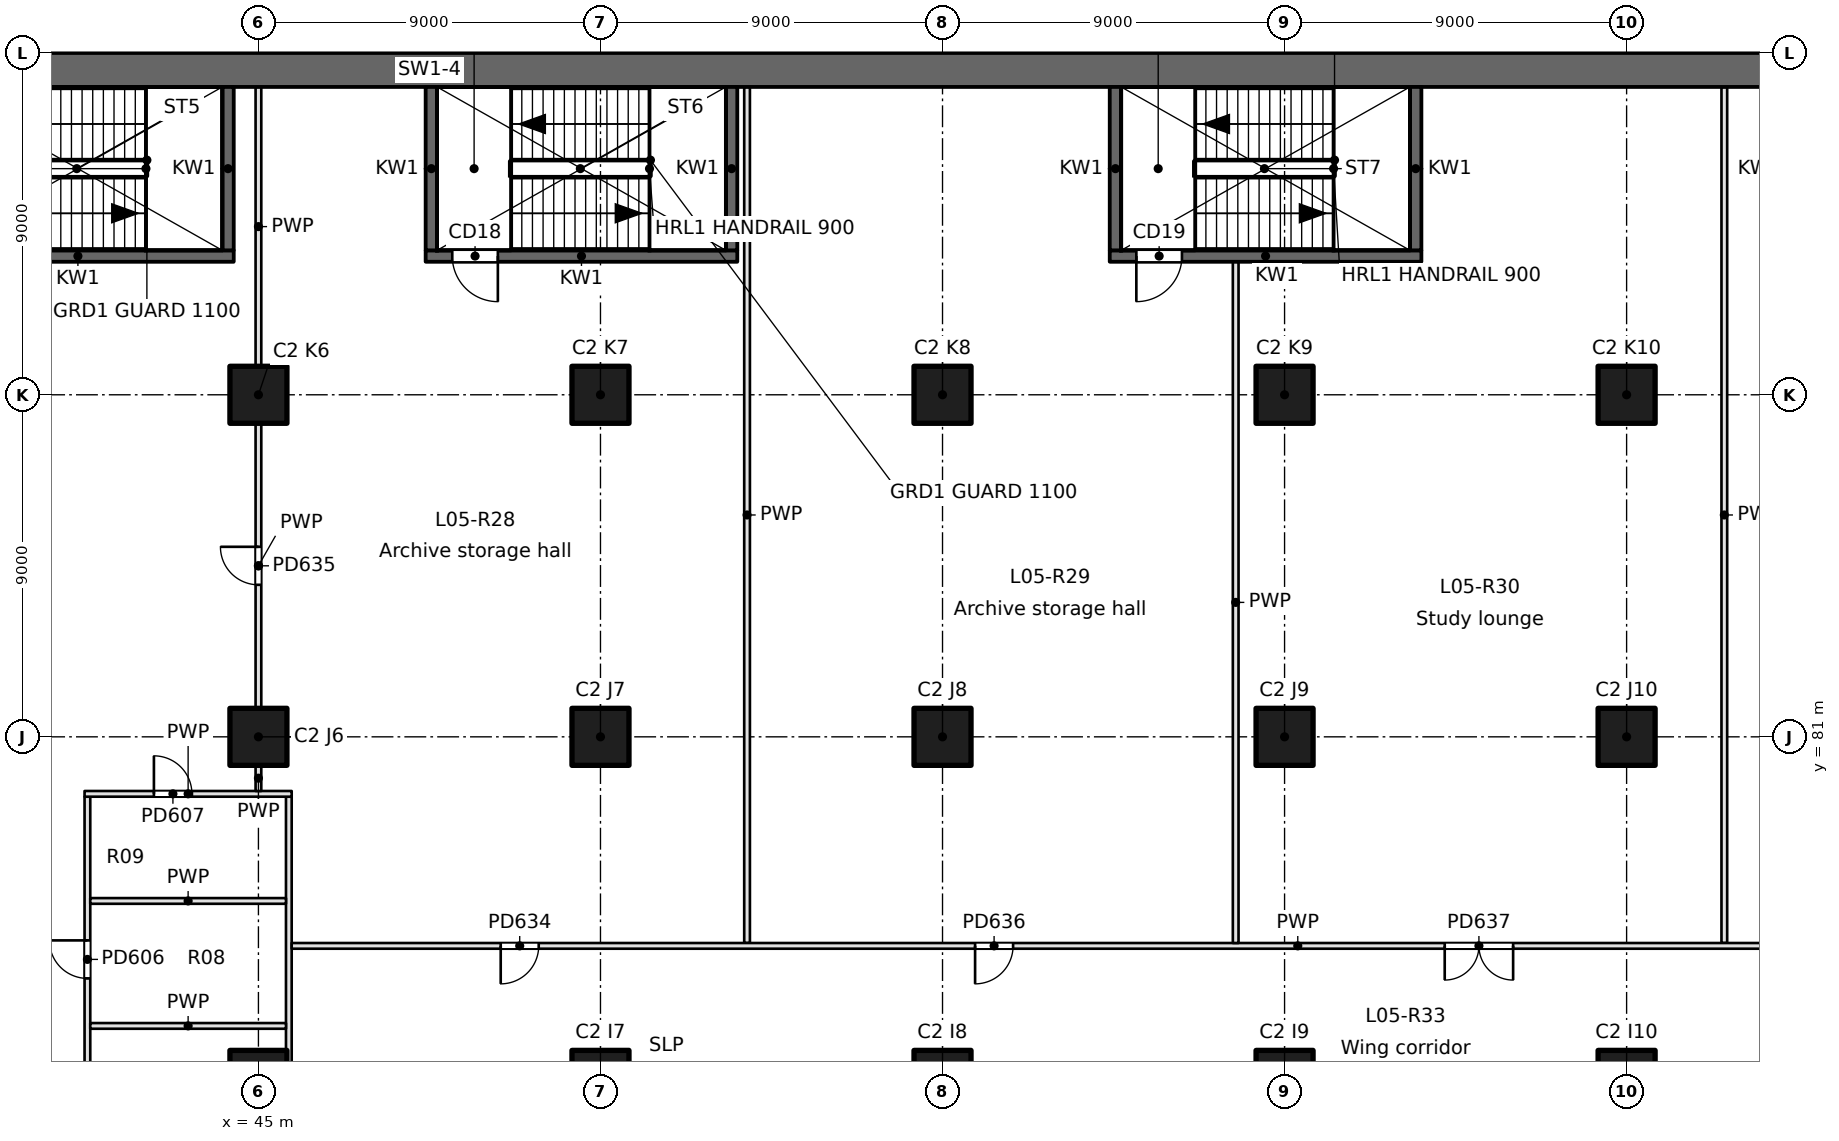
"""IFC4 building model, lengths in metres.
Left out: names, types, materials, properties, quantities, classifications, styles, units other than length and angle.
Written with IfcOpenShell. Run it as: python <this file> out.ifc"""

import sys

from ifc_helpers import new_model, si_unit, direction, frame, frame_2d, origin, origin_2d, place, context, subcontext, project, spatial, rectangle, extrude, element, fill, save


model = new_model("IFC4")
c1 = context("Model", 3, precision=1e-05, world=origin(), true_north=direction((0.0, 1.0)))
c2 = subcontext(c1, "Body", "Model", "MODEL_VIEW")
j1 = project(units=[si_unit("LENGTHUNIT", "METRE"), si_unit("PLANEANGLEUNIT", "RADIAN")], contexts=[c1])
p1 = place(None, origin())
s1 = spatial("IfcSite", under=j1, at=p1, CompositionType="ELEMENT")
p2 = place(p1, origin())
s2 = spatial("IfcBuilding", under=s1, at=p2, CompositionType="ELEMENT")
p3 = place(p2, frame((0.0, 0.0, 26.4)))
s3 = spatial("IfcBuildingStorey", under=s2, at=p3, CompositionType="ELEMENT", Elevation=26.4)
for number, where, z_axis, x_axis in (
    (1, (45.0, 72.0, 0.0), (0.0, 0.0, 1.0), (1.0, 0.0, 0.0)),
    (2, (45.0, 81.0, 0.0), (0.0, 0.0, 1.0), (1.0, 0.0, 0.0)),
    (3, (45.0, 90.0, 0.0), (0.0, 0.0, 1.0), (1.0, 0.0, 0.0)),
    (4, (54.0, 72.0, 0.0), (0.0, 0.0, 1.0), (1.0, 0.0, 0.0)),
    (5, (54.0, 81.0, 0.0), (0.0, 0.0, 1.0), (1.0, 0.0, 0.0)),
    (6, (54.0, 90.0, 0.0), (0.0, 0.0, 1.0), (1.0, 0.0, 0.0)),
    (7, (63.0, 72.0, 0.0), (0.0, 0.0, 1.0), (1.0, 0.0, 0.0)),
    (8, (63.0, 81.0, 0.0), (0.0, 0.0, 1.0), (1.0, 0.0, 0.0)),
    (9, (63.0, 90.0, 0.0), (0.0, 0.0, 1.0), (1.0, 0.0, 0.0)),
    (10, (72.0, 72.0, 0.0), (0.0, 0.0, 1.0), (1.0, 0.0, 0.0)),
    (11, (72.0, 81.0, 0.0), (0.0, 0.0, 1.0), (1.0, 0.0, 0.0)),
    (12, (72.0, 90.0, 0.0), (0.0, 0.0, 1.0), (1.0, 0.0, 0.0)),
    (13, (81.0, 72.0, 0.0), (0.0, 0.0, 1.0), (1.0, 0.0, 0.0)),
    (14, (81.0, 81.0, 0.0), (0.0, 0.0, 1.0), (1.0, 0.0, 0.0)),
    (15, (81.0, 90.0, 0.0), (0.0, 0.0, 1.0), (1.0, 0.0, 0.0)),
):
    element("IfcColumn", number, at=place(p3, frame(where, z_axis=z_axis, x_axis=x_axis)), inside=s3, PredefinedType="COLUMN", context=c2, shape_type="SweptSolid", body=[
        extrude(rectangle(XDim=1.5, YDim=1.5, at=origin_2d()), origin(), (0.0, 0.0, 1.0), 4.8),
    ])
p4 = place(p3, frame((94.5, 98.55, 0.0), z_axis=(0.0, 0.0, 1.0), x_axis=(-1.0, 0.0, 0.0)))
e16 = element("IfcWall", 16, at=p4, inside=s3, PredefinedType="SHEAR", context=c2, shape_type="SweptSolid", body=[
    extrude(rectangle(XDim=90.0, YDim=0.9, at=frame_2d((45.0, 0.0))), origin(), (0.0, 0.0, 1.0), 4.8),
])
p5 = place(p3, frame((36.15, 93.65, -0.35), z_axis=(0.0, 0.0, 1.0), x_axis=(1.0, 0.0, 0.0)))
e17 = element("IfcWall", 17, at=p5, inside=s3, PredefinedType="SOLIDWALL", context=c2, shape_type="SweptSolid", body=[
    extrude(rectangle(XDim=8.2, YDim=0.3, at=frame_2d((4.1, 0.0))), origin(), (0.0, 0.0, 1.0), 4.7),
])
p6 = place(p5, frame((0.7, 0.0, 0.35)))
e18 = element("IfcOpeningElement", 18, at=p6, cuts=e17, PredefinedType="OPENING", context=c2, shape_type="SweptSolid", body=[
    extrude(rectangle(XDim=1.2, YDim=2.1, at=frame_2d((0.6, 1.05))), frame((0.0, 0.15, 0.0), z_axis=(0.0, -1.0, 0.0), x_axis=(1.0, 0.0, 0.0)), (0.0, 0.0, 1.0), 0.3),
])
p7 = place(p3, frame((49.4, 93.65, -0.35), z_axis=(0.0, 0.0, 1.0), x_axis=(1.0, 0.0, 0.0)))
e19 = element("IfcWall", 19, at=p7, inside=s3, PredefinedType="SOLIDWALL", context=c2, shape_type="SweptSolid", body=[
    extrude(rectangle(XDim=8.2, YDim=0.3, at=frame_2d((4.1, 0.0))), origin(), (0.0, 0.0, 1.0), 4.7),
])
p8 = place(p7, frame((0.7, 0.0, 0.35)))
e20 = element("IfcOpeningElement", 20, at=p8, cuts=e19, PredefinedType="OPENING", context=c2, shape_type="SweptSolid", body=[
    extrude(rectangle(XDim=1.2, YDim=2.1, at=frame_2d((0.6, 1.05))), frame((0.0, 0.15, 0.0), z_axis=(0.0, -1.0, 0.0), x_axis=(1.0, 0.0, 0.0)), (0.0, 0.0, 1.0), 0.3),
])
p9 = place(p3, frame((67.4, 93.65, -0.35), z_axis=(0.0, 0.0, 1.0), x_axis=(1.0, 0.0, 0.0)))
e21 = element("IfcWall", 21, at=p9, inside=s3, PredefinedType="SOLIDWALL", context=c2, shape_type="SweptSolid", body=[
    extrude(rectangle(XDim=8.2, YDim=0.3, at=frame_2d((4.1, 0.0))), origin(), (0.0, 0.0, 1.0), 4.7),
])
p10 = place(p9, frame((0.7, 0.0, 0.35)))
e22 = element("IfcOpeningElement", 22, at=p10, cuts=e21, PredefinedType="OPENING", context=c2, shape_type="SweptSolid", body=[
    extrude(rectangle(XDim=1.2, YDim=2.1, at=frame_2d((0.6, 1.05))), frame((0.0, 0.15, 0.0), z_axis=(0.0, -1.0, 0.0), x_axis=(1.0, 0.0, 0.0)), (0.0, 0.0, 1.0), 0.3),
])
for number, where, z_axis, x_axis in (
    (23, (44.2, 93.8, -0.35), (0.0, 0.0, 1.0), (0.0, 1.0, 0.0)),
    (24, (49.55, 93.8, -0.35), (0.0, 0.0, 1.0), (0.0, 1.0, 0.0)),
    (25, (57.45, 93.8, -0.35), (0.0, 0.0, 1.0), (0.0, 1.0, 0.0)),
    (26, (67.55, 93.8, -0.35), (0.0, 0.0, 1.0), (0.0, 1.0, 0.0)),
    (27, (75.45, 93.8, -0.35), (0.0, 0.0, 1.0), (0.0, 1.0, 0.0)),
):
    element("IfcWall", number, at=place(p3, frame(where, z_axis=z_axis, x_axis=x_axis)), inside=s3, PredefinedType="SOLIDWALL", context=c2, shape_type="SweptSolid", body=[
        extrude(rectangle(XDim=4.3, YDim=0.3, at=frame_2d((2.15, 0.0))), origin(), (0.0, 0.0, 1.0), 4.7),
    ])
p11 = place(p3, frame((45.8, 79.425, 0.0), z_axis=(0.0, 0.0, 1.0), x_axis=(0.0, -1.0, 0.0)))
e28 = element("IfcWall", 28, at=p11, inside=s3, PredefinedType="PARTITIONING", context=c2, shape_type="SweptSolid", body=[
    extrude(rectangle(XDim=15.35, YDim=0.15, at=frame_2d((7.675, 0.0))), origin(), (0.0, 0.0, 1.0), 4.35),
])
p12 = place(p3, frame((40.5, 64.075, 0.0), z_axis=(0.0, 0.0, 1.0), x_axis=(0.0, 1.0, 0.0)))
e29 = element("IfcWall", 29, at=p12, inside=s3, PredefinedType="PARTITIONING", context=c2, shape_type="SweptSolid", body=[
    extrude(rectangle(XDim=15.35, YDim=0.15, at=frame_2d((7.675, 0.0))), origin(), (0.0, 0.0, 1.0), 4.35),
])
p13 = place(p12, frame((1.75, 0.0, 0.0)))
e30 = element("IfcOpeningElement", 30, at=p13, cuts=e29, PredefinedType="OPENING", context=c2, shape_type="SweptSolid", body=[
    extrude(rectangle(XDim=1.0, YDim=2.1, at=frame_2d((0.5, 1.05))), frame((0.0, 0.075, 0.0), z_axis=(0.0, -1.0, 0.0), x_axis=(1.0, 0.0, 0.0)), (0.0, 0.0, 1.0), 0.15),
])
p14 = place(p12, frame((6.372, 0.0, 0.0)))
e31 = element("IfcOpeningElement", 31, at=p14, cuts=e29, PredefinedType="OPENING", context=c2, shape_type="SweptSolid", body=[
    extrude(rectangle(XDim=1.0, YDim=2.1, at=frame_2d((0.5, 1.05))), frame((0.0, 0.075, 0.0), z_axis=(0.0, -1.0, 0.0), x_axis=(1.0, 0.0, 0.0)), (0.0, 0.0, 1.0), 0.15),
])
p15 = place(p12, frame((10.569, 0.0, 0.0)))
e32 = element("IfcOpeningElement", 32, at=p15, cuts=e29, PredefinedType="OPENING", context=c2, shape_type="SweptSolid", body=[
    extrude(rectangle(XDim=1.0, YDim=2.1, at=frame_2d((0.5, 1.05))), frame((0.0, 0.075, 0.0), z_axis=(0.0, -1.0, 0.0), x_axis=(1.0, 0.0, 0.0)), (0.0, 0.0, 1.0), 0.15),
])
for number, where, z_axis, x_axis in (
    (33, (40.575, 73.394, 0.0), (0.0, 0.0, 1.0), (1.0, 0.0, 0.0)),
    (34, (40.575, 76.682, 0.0), (0.0, 0.0, 1.0), (1.0, 0.0, 0.0)),
):
    element("IfcWall", number, at=place(p3, frame(where, z_axis=z_axis, x_axis=x_axis)), inside=s3, PredefinedType="PARTITIONING", context=c2, shape_type="SweptSolid", body=[
        extrude(rectangle(XDim=5.15, YDim=0.15, at=frame_2d((2.575, 0.0))), origin(), (0.0, 0.0, 1.0), 4.35),
    ])
p16 = place(p3, frame((40.425, 79.5, 0.0), z_axis=(0.0, 0.0, 1.0), x_axis=(1.0, 0.0, 0.0)))
e35 = element("IfcWall", 35, at=p16, inside=s3, PredefinedType="PARTITIONING", context=c2, shape_type="SweptSolid", body=[
    extrude(rectangle(XDim=5.45, YDim=0.15, at=frame_2d((2.725, 0.0))), origin(), (0.0, 0.0, 1.0), 4.35),
])
p17 = place(p16, frame((1.825, 0.0, 0.0)))
e36 = element("IfcOpeningElement", 36, at=p17, cuts=e35, PredefinedType="OPENING", context=c2, shape_type="SweptSolid", body=[
    extrude(rectangle(XDim=1.0, YDim=2.1, at=frame_2d((0.5, 1.05))), frame((0.0, 0.075, 0.0), z_axis=(0.0, -1.0, 0.0), x_axis=(1.0, 0.0, 0.0)), (0.0, 0.0, 1.0), 0.15),
])
p18 = place(p3, frame((45.0, 79.575, 0.0), z_axis=(0.0, 0.0, 1.0), x_axis=(0.0, 1.0, 0.0)))
e37 = element("IfcWall", 37, at=p18, inside=s3, PredefinedType="PARTITIONING", context=c2, shape_type="SweptSolid", body=[
    extrude(rectangle(XDim=0.675, YDim=0.15, at=frame_2d((0.337, 0.0))), origin(), (0.0, 0.0, 1.0), 4.35),
])
p19 = place(p3, frame((45.0, 81.75, 0.0), z_axis=(0.0, 0.0, 1.0), x_axis=(0.0, 1.0, 0.0)))
e38 = element("IfcWall", 38, at=p19, inside=s3, PredefinedType="PARTITIONING", context=c2, shape_type="SweptSolid", body=[
    extrude(rectangle(XDim=7.5, YDim=0.15, at=frame_2d((3.75, 0.0))), origin(), (0.0, 0.0, 1.0), 4.35),
])
p20 = place(p19, frame((3.25, 0.0, 0.0)))
e39 = element("IfcOpeningElement", 39, at=p20, cuts=e38, PredefinedType="OPENING", context=c2, shape_type="SweptSolid", body=[
    extrude(rectangle(XDim=1.0, YDim=2.1, at=frame_2d((0.5, 1.05))), frame((0.0, 0.075, 0.0), z_axis=(0.0, -1.0, 0.0), x_axis=(1.0, 0.0, 0.0)), (0.0, 0.0, 1.0), 0.15),
])
p21 = place(p3, frame((45.0, 90.75, 0.0), z_axis=(0.0, 0.0, 1.0), x_axis=(0.0, 1.0, 0.0)))
e40 = element("IfcWall", 40, at=p21, inside=s3, PredefinedType="PARTITIONING", context=c2, shape_type="SweptSolid", body=[
    extrude(rectangle(XDim=7.35, YDim=0.15, at=frame_2d((3.675, 0.0))), origin(), (0.0, 0.0, 1.0), 4.35),
])
for number, where, z_axis, x_axis in (
    (41, (83.571, 75.575, 0.0), (0.0, 0.0, 1.0), (0.0, 1.0, 0.0)),
    (42, (57.857, 75.575, 0.0), (0.0, 0.0, 1.0), (0.0, 1.0, 0.0)),
):
    element("IfcWall", number, at=place(p3, frame(where, z_axis=z_axis, x_axis=x_axis)), inside=s3, PredefinedType="PARTITIONING", context=c2, shape_type="SweptSolid", body=[
        extrude(rectangle(XDim=22.525, YDim=0.15, at=frame_2d((11.263, 0.0))), origin(), (0.0, 0.0, 1.0), 4.35),
    ])
p22 = place(p3, frame((98.82, 75.5, 0.0), z_axis=(0.0, 0.0, 1.0), x_axis=(-1.0, 0.0, 0.0)))
e43 = element("IfcWall", 43, at=p22, inside=s3, PredefinedType="PARTITIONING", context=c2, shape_type="SweptSolid", body=[
    extrude(rectangle(XDim=52.945, YDim=0.15, at=frame_2d((26.473, 0.0))), origin(), (0.0, 0.0, 1.0), 4.35),
])
p23 = place(p22, frame((46.445, 0.0, 0.0)))
e44 = element("IfcOpeningElement", 44, at=p23, cuts=e43, PredefinedType="OPENING", context=c2, shape_type="SweptSolid", body=[
    extrude(rectangle(XDim=1.0, YDim=2.1, at=frame_2d((0.5, 1.05))), frame((0.0, 0.075, 0.0), z_axis=(0.0, -1.0, 0.0), x_axis=(1.0, 0.0, 0.0)), (0.0, 0.0, 1.0), 0.15),
])
p24 = place(p22, frame((33.963, 0.0, 0.0)))
e45 = element("IfcOpeningElement", 45, at=p24, cuts=e43, PredefinedType="OPENING", context=c2, shape_type="SweptSolid", body=[
    extrude(rectangle(XDim=1.0, YDim=2.1, at=frame_2d((0.5, 1.05))), frame((0.0, 0.075, 0.0), z_axis=(0.0, -1.0, 0.0), x_axis=(1.0, 0.0, 0.0)), (0.0, 0.0, 1.0), 0.15),
])
p25 = place(p22, frame((20.806, 0.0, 0.0)))
e46 = element("IfcOpeningElement", 46, at=p25, cuts=e43, PredefinedType="OPENING", context=c2, shape_type="SweptSolid", body=[
    extrude(rectangle(XDim=1.8, YDim=2.1, at=frame_2d((0.9, 1.05))), frame((0.0, 0.075, 0.0), z_axis=(0.0, -1.0, 0.0), x_axis=(1.0, 0.0, 0.0)), (0.0, 0.0, 1.0), 0.15),
])
p26 = place(p22, frame((6.699, 0.0, 0.0)))
e47 = element("IfcOpeningElement", 47, at=p26, cuts=e43, PredefinedType="OPENING", context=c2, shape_type="SweptSolid", body=[
    extrude(rectangle(XDim=1.8, YDim=2.1, at=frame_2d((0.9, 1.05))), frame((0.0, 0.075, 0.0), z_axis=(0.0, -1.0, 0.0), x_axis=(1.0, 0.0, 0.0)), (0.0, 0.0, 1.0), 0.15),
])
p27 = place(p3, frame((70.714, 75.575, 0.0), z_axis=(0.0, 0.0, 1.0), x_axis=(0.0, 1.0, 0.0)))
e48 = element("IfcWall", 48, at=p27, inside=s3, PredefinedType="PARTITIONING", context=c2, shape_type="SweptSolid", body=[
    extrude(rectangle(XDim=17.925, YDim=0.15, at=frame_2d((8.962, 0.0))), origin(), (0.0, 0.0, 1.0), 4.35),
])
p28 = place(p8, frame((1.2, 0.0, 0.0), z_axis=(0.0, 0.0, 1.0), x_axis=(-1.0, 0.0, 0.0)))
e49 = element("IfcDoor", 49, at=p28, inside=s3, OperationType="SINGLE_SWING_LEFT", PredefinedType="DOOR", context=c2, shape_type="SweptSolid", body=[
    extrude(rectangle(XDim=1.2, YDim=2.1, at=frame_2d((0.6, 1.05))), frame((0.0, 0.025, 0.0), z_axis=(0.0, -1.0, 0.0), x_axis=(1.0, 0.0, 0.0)), (0.0, 0.0, 1.0), 0.05),
])
fill(e20, e49)
p29 = place(p10, frame((1.2, 0.0, 0.0), z_axis=(0.0, 0.0, 1.0), x_axis=(-1.0, 0.0, 0.0)))
e50 = element("IfcDoor", 50, at=p29, inside=s3, OperationType="SINGLE_SWING_RIGHT", PredefinedType="DOOR", context=c2, shape_type="SweptSolid", body=[
    extrude(rectangle(XDim=1.2, YDim=2.1, at=frame_2d((0.6, 1.05))), frame((0.0, 0.025, 0.0), z_axis=(0.0, -1.0, 0.0), x_axis=(1.0, 0.0, 0.0)), (0.0, 0.0, 1.0), 0.05),
])
fill(e22, e50)
p30 = place(p15, origin())
e51 = element("IfcDoor", 51, at=p30, inside=s3, OperationType="SINGLE_SWING_RIGHT", PredefinedType="DOOR", context=c2, shape_type="SweptSolid", body=[
    extrude(rectangle(XDim=1.0, YDim=2.1, at=frame_2d((0.5, 1.05))), frame((0.0, 0.025, 0.0), z_axis=(0.0, -1.0, 0.0), x_axis=(1.0, 0.0, 0.0)), (0.0, 0.0, 1.0), 0.05),
])
fill(e32, e51)
p31 = place(p17, origin())
e52 = element("IfcDoor", 52, at=p31, inside=s3, OperationType="SINGLE_SWING_LEFT", PredefinedType="DOOR", context=c2, shape_type="SweptSolid", body=[
    extrude(rectangle(XDim=1.0, YDim=2.1, at=frame_2d((0.5, 1.05))), frame((0.0, 0.025, 0.0), z_axis=(0.0, -1.0, 0.0), x_axis=(1.0, 0.0, 0.0)), (0.0, 0.0, 1.0), 0.05),
])
fill(e36, e52)
p32 = place(p23, origin())
e53 = element("IfcDoor", 53, at=p32, inside=s3, OperationType="SINGLE_SWING_RIGHT", PredefinedType="DOOR", context=c2, shape_type="SweptSolid", body=[
    extrude(rectangle(XDim=1.0, YDim=2.1, at=frame_2d((0.5, 1.05))), frame((0.0, 0.025, 0.0), z_axis=(0.0, -1.0, 0.0), x_axis=(1.0, 0.0, 0.0)), (0.0, 0.0, 1.0), 0.05),
])
fill(e44, e53)
p33 = place(p20, origin())
e54 = element("IfcDoor", 54, at=p33, inside=s3, OperationType="SINGLE_SWING_RIGHT", PredefinedType="DOOR", context=c2, shape_type="SweptSolid", body=[
    extrude(rectangle(XDim=1.0, YDim=2.1, at=frame_2d((0.5, 1.05))), frame((0.0, 0.025, 0.0), z_axis=(0.0, -1.0, 0.0), x_axis=(1.0, 0.0, 0.0)), (0.0, 0.0, 1.0), 0.05),
])
fill(e39, e54)
p34 = place(p24, origin())
e55 = element("IfcDoor", 55, at=p34, inside=s3, OperationType="SINGLE_SWING_RIGHT", PredefinedType="DOOR", context=c2, shape_type="SweptSolid", body=[
    extrude(rectangle(XDim=1.0, YDim=2.1, at=frame_2d((0.5, 1.05))), frame((0.0, 0.025, 0.0), z_axis=(0.0, -1.0, 0.0), x_axis=(1.0, 0.0, 0.0)), (0.0, 0.0, 1.0), 0.05),
])
fill(e45, e55)
p35 = place(p25, origin())
e56 = element("IfcDoor", 56, at=p35, inside=s3, OperationType="DOUBLE_DOOR_SINGLE_SWING", PredefinedType="DOOR", context=c2, shape_type="SweptSolid", body=[
    extrude(rectangle(XDim=1.8, YDim=2.1, at=frame_2d((0.9, 1.05))), frame((0.0, 0.025, 0.0), z_axis=(0.0, -1.0, 0.0), x_axis=(1.0, 0.0, 0.0)), (0.0, 0.0, 1.0), 0.05),
])
fill(e46, e56)
save(model, sys.argv[1])
